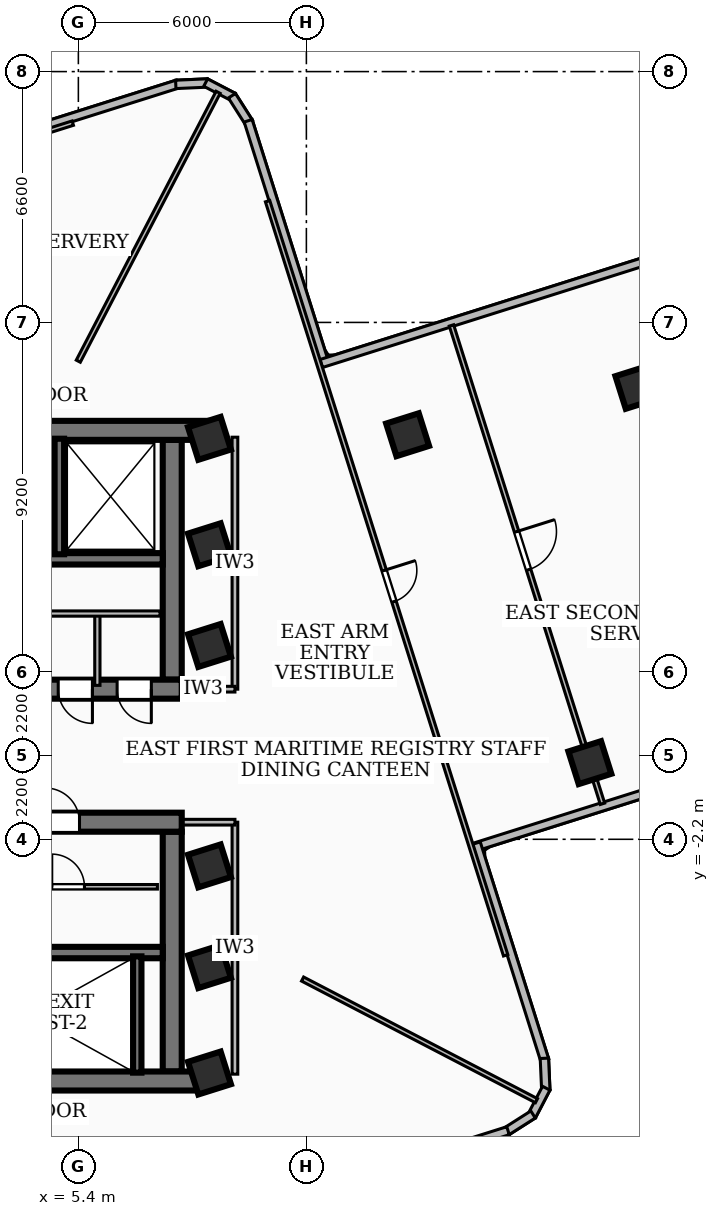
"""IFC4 building model, lengths in metres.
Left out: names, types, materials, properties, quantities, classifications, styles, units other than length and angle.
Written with IfcOpenShell. Run it as: python <this file> out.ifc"""

import sys

from ifc_helpers import new_model, si_unit, direction, frame, frame_2d, origin, origin_2d, place, context, subcontext, project, spatial, rectangle, extrude, element, fill, save


model = new_model("IFC4")
c1 = context("Model", 3, precision=1e-05, world=origin(), true_north=direction((0.0, 1.0)))
c2 = subcontext(c1, "Body", "Model", "MODEL_VIEW")
j1 = project(units=[si_unit("LENGTHUNIT", "METRE"), si_unit("PLANEANGLEUNIT", "RADIAN")], contexts=[c1])
p1 = place(None, origin())
s1 = spatial("IfcSite", under=j1, at=p1, CompositionType="ELEMENT")
p2 = place(p1, origin())
s2 = spatial("IfcBuilding", under=s1, at=p2, CompositionType="ELEMENT")
p3 = place(p2, frame((0.0, 0.0, 152.28)))
s3 = spatial("IfcBuildingStorey", under=s2, at=p3, CompositionType="ELEMENT", Elevation=152.28)
p4 = place(p3, frame((-8.78, 8.56, 0.0), z_axis=(0.0, 0.0, 1.0), x_axis=(1.0, 0.0, 0.0)))
e1 = element("IfcWall", 1, at=p4, inside=s3, PredefinedType="SHEAR", context=c2, shape_type="SweptSolid", body=[
    extrude(rectangle(XDim=17.56, YDim=0.5, at=frame_2d((8.78, 0.0))), origin(), (0.0, 0.0, 1.0), 3.34),
])
p5 = place(p3, frame((8.12, 1.75, 0.0), z_axis=(0.0, 0.0, 1.0), x_axis=(-1.0, 0.0, 0.0)))
e2 = element("IfcWall", 2, at=p5, inside=s3, PredefinedType="SHEAR", context=c2, shape_type="SweptSolid", body=[
    extrude(rectangle(XDim=16.24, YDim=0.5, at=frame_2d((8.12, 0.0))), origin(), (0.0, 0.0, 1.0), 3.34),
])
p6 = place(p5, frame((7.45, 0.0, 0.0)))
e3 = element("IfcOpeningElement", 3, at=p6, cuts=e2, PredefinedType="OPENING", context=c2, shape_type="SweptSolid", body=[
    extrude(rectangle(XDim=1.0, YDim=2.1, at=frame_2d((0.5, 1.05))), frame((0.0, 0.26, 0.0), z_axis=(0.0, -1.0, 0.0), x_axis=(1.0, 0.0, 0.0)), (0.0, 0.0, 1.0), 0.52),
])
p7 = place(p5, frame((3.85, 0.0, 0.0)))
e4 = element("IfcOpeningElement", 4, at=p7, cuts=e2, PredefinedType="OPENING", context=c2, shape_type="SweptSolid", body=[
    extrude(rectangle(XDim=0.9, YDim=2.06, at=frame_2d((0.45, 1.03))), frame((0.0, 0.26, 0.0), z_axis=(0.0, -1.0, 0.0), x_axis=(1.0, 0.0, 0.0)), (0.0, 0.0, 1.0), 0.52),
])
p8 = place(p5, frame((2.35, 0.0, 0.0)))
e5 = element("IfcOpeningElement", 5, at=p8, cuts=e2, PredefinedType="OPENING", context=c2, shape_type="SweptSolid", body=[
    extrude(rectangle(XDim=0.9, YDim=2.06, at=frame_2d((0.45, 1.03))), frame((0.0, 0.26, 0.0), z_axis=(0.0, -1.0, 0.0), x_axis=(1.0, 0.0, 0.0)), (0.0, 0.0, 1.0), 0.52),
])
p9 = place(p5, frame((0.8, 0.0, 0.0)))
e6 = element("IfcOpeningElement", 6, at=p9, cuts=e2, PredefinedType="OPENING", context=c2, shape_type="SweptSolid", body=[
    extrude(rectangle(XDim=0.9, YDim=2.06, at=frame_2d((0.45, 1.03))), frame((0.0, 0.26, 0.0), z_axis=(0.0, -1.0, 0.0), x_axis=(1.0, 0.0, 0.0)), (0.0, 0.0, 1.0), 0.52),
])
p10 = place(p3, frame((7.87, 8.31, 0.0), z_axis=(0.0, 0.0, 1.0), x_axis=(0.0, -1.0, 0.0)))
e7 = element("IfcWall", 7, at=p10, inside=s3, PredefinedType="SHEAR", context=c2, shape_type="SweptSolid", body=[
    extrude(rectangle(XDim=6.31, YDim=0.5, at=frame_2d((3.155, 0.0))), origin(), (0.0, 0.0, 1.0), 3.34),
])
p11 = place(p3, frame((7.62, 5.18, 0.0), z_axis=(0.0, 0.0, 1.0), x_axis=(-1.0, 0.0, 0.0)))
e8 = element("IfcWall", 8, at=p11, inside=s3, PredefinedType="SOLIDWALL", context=c2, shape_type="SweptSolid", body=[
    extrude(rectangle(XDim=15.24, YDim=0.3, at=frame_2d((7.62, 0.0))), origin(), (0.0, 0.0, 1.0), 3.34),
])
p12 = place(p11, frame((5.77, 0.0, 0.0)))
e9 = element("IfcOpeningElement", 9, at=p12, cuts=e8, PredefinedType="OPENING", context=c2, shape_type="SweptSolid", body=[
    extrude(rectangle(XDim=1.1, YDim=2.15, at=frame_2d((0.55, 1.075))), frame((0.0, 0.16, 0.0), z_axis=(0.0, -1.0, 0.0), x_axis=(1.0, 0.0, 0.0)), (0.0, 0.0, 1.0), 0.32),
])
p13 = place(p11, frame((2.97, 0.0, 0.0)))
e10 = element("IfcOpeningElement", 10, at=p13, cuts=e8, PredefinedType="OPENING", context=c2, shape_type="SweptSolid", body=[
    extrude(rectangle(XDim=1.1, YDim=2.15, at=frame_2d((0.55, 1.075))), frame((0.0, 0.16, 0.0), z_axis=(0.0, -1.0, 0.0), x_axis=(1.0, 0.0, 0.0)), (0.0, 0.0, 1.0), 0.32),
])
p14 = place(p11, frame((7.97, 0.0, 0.0)))
e11 = element("IfcOpeningElement", 11, at=p14, cuts=e8, PredefinedType="OPENING", context=c2, shape_type="SweptSolid", body=[
    extrude(rectangle(XDim=1.0, YDim=2.1, at=frame_2d((0.5, 1.05))), frame((0.0, 0.16, 0.0), z_axis=(0.0, -1.0, 0.0), x_axis=(1.0, 0.0, 0.0)), (0.0, 0.0, 1.0), 0.32),
])
p15 = place(p3, frame((8.78, -8.56, 0.0), z_axis=(0.0, 0.0, 1.0), x_axis=(-1.0, 0.0, 0.0)))
e12 = element("IfcWall", 12, at=p15, inside=s3, PredefinedType="SHEAR", context=c2, shape_type="SweptSolid", body=[
    extrude(rectangle(XDim=17.56, YDim=0.5, at=frame_2d((8.78, 0.0))), origin(), (0.0, 0.0, 1.0), 3.34),
])
p16 = place(p3, frame((-8.12, -1.75, 0.0), z_axis=(0.0, 0.0, 1.0), x_axis=(1.0, 0.0, 0.0)))
e13 = element("IfcWall", 13, at=p16, inside=s3, PredefinedType="SHEAR", context=c2, shape_type="SweptSolid", body=[
    extrude(rectangle(XDim=16.24, YDim=0.5, at=frame_2d((8.12, 0.0))), origin(), (0.0, 0.0, 1.0), 3.34),
])
p17 = place(p16, frame((7.45, 0.0, 0.0)))
e14 = element("IfcOpeningElement", 14, at=p17, cuts=e13, PredefinedType="OPENING", context=c2, shape_type="SweptSolid", body=[
    extrude(rectangle(XDim=1.0, YDim=2.1, at=frame_2d((0.5, 1.05))), frame((0.0, 0.26, 0.0), z_axis=(0.0, -1.0, 0.0), x_axis=(1.0, 0.0, 0.0)), (0.0, 0.0, 1.0), 0.52),
])
p18 = place(p16, frame((12.65, 0.0, 0.0)))
e15 = element("IfcOpeningElement", 15, at=p18, cuts=e13, PredefinedType="OPENING", context=c2, shape_type="SweptSolid", body=[
    extrude(rectangle(XDim=0.9, YDim=2.06, at=frame_2d((0.45, 1.03))), frame((0.0, 0.26, 0.0), z_axis=(0.0, -1.0, 0.0), x_axis=(1.0, 0.0, 0.0)), (0.0, 0.0, 1.0), 0.52),
])
p19 = place(p16, frame((0.565, 0.0, 0.0)))
e16 = element("IfcOpeningElement", 16, at=p19, cuts=e13, PredefinedType="OPENING", context=c2, shape_type="SweptSolid", body=[
    extrude(rectangle(XDim=1.05, YDim=2.15, at=frame_2d((0.525, 1.075))), frame((0.0, 0.26, 0.0), z_axis=(0.0, -1.0, 0.0), x_axis=(1.0, 0.0, 0.0)), (0.0, 0.0, 1.0), 0.52),
])
p20 = place(p16, frame((2.125, 0.0, 0.0)))
e17 = element("IfcOpeningElement", 17, at=p20, cuts=e13, PredefinedType="OPENING", context=c2, shape_type="SweptSolid", body=[
    extrude(rectangle(XDim=1.05, YDim=2.15, at=frame_2d((0.525, 1.075))), frame((0.0, 0.26, 0.0), z_axis=(0.0, -1.0, 0.0), x_axis=(1.0, 0.0, 0.0)), (0.0, 0.0, 1.0), 0.52),
])
p21 = place(p16, frame((3.685, 0.0, 0.0)))
e18 = element("IfcOpeningElement", 18, at=p21, cuts=e13, PredefinedType="OPENING", context=c2, shape_type="SweptSolid", body=[
    extrude(rectangle(XDim=1.05, YDim=2.15, at=frame_2d((0.525, 1.075))), frame((0.0, 0.26, 0.0), z_axis=(0.0, -1.0, 0.0), x_axis=(1.0, 0.0, 0.0)), (0.0, 0.0, 1.0), 0.52),
])
p22 = place(p3, frame((7.87, -2.0, 0.0), z_axis=(0.0, 0.0, 1.0), x_axis=(0.0, -1.0, 0.0)))
e19 = element("IfcWall", 19, at=p22, inside=s3, PredefinedType="SHEAR", context=c2, shape_type="SweptSolid", body=[
    extrude(rectangle(XDim=6.31, YDim=0.5, at=frame_2d((3.155, 0.0))), origin(), (0.0, 0.0, 1.0), 3.34),
])
p23 = place(p3, frame((-7.62, -5.18, 0.0), z_axis=(0.0, 0.0, 1.0), x_axis=(1.0, 0.0, 0.0)))
e20 = element("IfcWall", 20, at=p23, inside=s3, PredefinedType="SOLIDWALL", context=c2, shape_type="SweptSolid", body=[
    extrude(rectangle(XDim=15.24, YDim=0.3, at=frame_2d((7.62, 0.0))), origin(), (0.0, 0.0, 1.0), 3.34),
])
p24 = place(p23, frame((5.77, 0.0, 0.0)))
e21 = element("IfcOpeningElement", 21, at=p24, cuts=e20, PredefinedType="OPENING", context=c2, shape_type="SweptSolid", body=[
    extrude(rectangle(XDim=1.1, YDim=2.15, at=frame_2d((0.55, 1.075))), frame((0.0, 0.16, 0.0), z_axis=(0.0, -1.0, 0.0), x_axis=(1.0, 0.0, 0.0)), (0.0, 0.0, 1.0), 0.32),
])
p25 = place(p23, frame((7.97, 0.0, 0.0)))
e22 = element("IfcOpeningElement", 22, at=p25, cuts=e20, PredefinedType="OPENING", context=c2, shape_type="SweptSolid", body=[
    extrude(rectangle(XDim=1.0, YDim=2.1, at=frame_2d((0.5, 1.05))), frame((0.0, 0.16, 0.0), z_axis=(0.0, -1.0, 0.0), x_axis=(1.0, 0.0, 0.0)), (0.0, 0.0, 1.0), 0.32),
])
p26 = place(p3, frame((6.95, -8.34, 0.0), z_axis=(0.0, 0.0, 1.0), x_axis=(0.0, 1.0, 0.0)))
e23 = element("IfcWall", 23, at=p26, inside=s3, PredefinedType="SOLIDWALL", context=c2, shape_type="SweptSolid", body=[
    extrude(rectangle(XDim=3.06, YDim=0.22, at=frame_2d((1.53, 0.0))), origin(), (0.0, 0.0, 1.0), 3.34),
])
p27 = place(p3, frame((4.9, 5.3, 0.0), z_axis=(0.0, 0.0, 1.0), x_axis=(0.0, 1.0, 0.0)))
e24 = element("IfcWall", 24, at=p27, inside=s3, PredefinedType="SOLIDWALL", context=c2, shape_type="SweptSolid", body=[
    extrude(rectangle(XDim=3.04, YDim=0.25, at=frame_2d((1.52, 0.0))), origin(), (0.0, 0.0, 1.0), 3.34),
])
for number, where, z_axis, x_axis in (
    (25, (8.85, -5.55, 0.0), (0.0, 0.0, 1.0), (0.954, 0.301, 0.0)),
    (26, (8.85, -2.9, 0.0), (0.0, 0.0, 1.0), (0.954, 0.301, 0.0)),
    (27, (8.85, 2.9, 0.0), (0.0, 0.0, 1.0), (0.954, 0.301, 0.0)),
    (28, (8.85, 5.55, 0.0), (0.0, 0.0, 1.0), (0.954, 0.301, 0.0)),
    (29, (8.85, -8.35, 0.0), (0.0, 0.0, 1.0), (0.954, 0.301, 0.0)),
    (30, (8.85, 8.35, 0.0), (0.0, 0.0, 1.0), (0.954, 0.301, 0.0)),
    (31, (18.86, -0.183, 0.0), (0.0, 0.0, 1.0), (0.954, 0.301, 0.0)),
    (32, (14.064, 8.445, 0.0), (0.0, 0.0, 1.0), (0.954, 0.301, 0.0)),
    (33, (20.098, 9.692, 0.0), (0.0, 0.0, 1.0), (0.954, 0.301, 0.0)),
):
    element("IfcColumn", number, at=place(p3, frame(where, z_axis=z_axis, x_axis=x_axis)), inside=s3, PredefinedType="COLUMN", context=c2, shape_type="SweptSolid", body=[
        extrude(rectangle(XDim=0.9, YDim=0.9, at=origin_2d()), origin(), (0.0, 0.0, 1.0), 3.6),
    ])
p28 = place(p3, frame((2.301, 15.87, 0.0), z_axis=(0.0, 0.0, 1.0), x_axis=(0.953652264112, 0.300910882413, 0.0)))
e34 = element("IfcWall", 34, at=p28, inside=s3, PredefinedType="SOLIDWALL", context=c2, shape_type="SweptSolid", body=[
    extrude(rectangle(XDim=5.989, YDim=0.22, at=frame_2d((2.994, 0.0))), origin(), (0.0, 0.0, 1.0), 2.152),
])
p29 = place(p3, frame((7.963, 17.663, 0.0), z_axis=(0.0, 0.0, 1.0), x_axis=(0.99902501388, 0.044147725226, 0.0)))
e35 = element("IfcWall", 35, at=p29, inside=s3, PredefinedType="SOLIDWALL", context=c2, shape_type="SweptSolid", body=[
    extrude(rectangle(XDim=0.835, YDim=0.22, at=frame_2d((0.417, 0.0))), origin(), (0.0, 0.0, 1.0), 3.34),
])
p30 = place(p3, frame((8.75, 17.711, 0.0), z_axis=(0.0, 0.0, 1.0), x_axis=(0.886542320322, -0.462647505427, 0.0)))
e36 = element("IfcWall", 36, at=p30, inside=s3, PredefinedType="SOLIDWALL", context=c2, shape_type="SweptSolid", body=[
    extrude(rectangle(XDim=0.819, YDim=0.22, at=frame_2d((0.41, 0.0))), origin(), (0.0, 0.0, 1.0), 3.34),
])
p31 = place(p3, frame((9.441, 17.365, 0.0), z_axis=(0.0, 0.0, 1.0), x_axis=(0.536818702975, -0.84369762364, 0.0)))
e37 = element("IfcWall", 37, at=p31, inside=s3, PredefinedType="SOLIDWALL", context=c2, shape_type="SweptSolid", body=[
    extrude(rectangle(XDim=0.834, YDim=0.22, at=frame_2d((0.417, 0.0))), origin(), (0.0, 0.0, 1.0), 3.34),
])
p32 = place(p3, frame((9.868, 16.706, 0.0), z_axis=(0.0, 0.0, 1.0), x_axis=(0.300982683852, -0.953629605256, 0.0)))
e38 = element("IfcWall", 38, at=p32, inside=s3, PredefinedType="SOLIDWALL", context=c2, shape_type="SweptSolid", body=[
    extrude(rectangle(XDim=6.759, YDim=0.22, at=frame_2d((3.379, 0.0))), origin(), (0.0, 0.0, 1.0), 2.152),
])
p33 = place(p3, frame((11.792, 10.319, 0.0), z_axis=(0.0, 0.0, 1.0), x_axis=(0.953607060649, 0.301054104573, 0.0)))
e39 = element("IfcWall", 39, at=p33, inside=s3, PredefinedType="SOLIDWALL", context=c2, shape_type="SweptSolid", body=[
    extrude(rectangle(XDim=13.459, YDim=0.22, at=frame_2d((6.73, 0.0))), origin(), (0.0, 0.0, 1.0), 2.152),
])
p34 = place(p3, frame((28.646, 1.64, 0.0), z_axis=(0.0, 0.0, 1.0), x_axis=(-0.953626521982, -0.300992452685, 0.0)))
e40 = element("IfcWall", 40, at=p34, inside=s3, PredefinedType="SOLIDWALL", context=c2, shape_type="SweptSolid", body=[
    extrude(rectangle(XDim=13.458, YDim=0.22, at=frame_2d((6.729, 0.0))), origin(), (0.0, 0.0, 1.0), 3.34),
])
p35 = place(p34, frame((0.85, 0.0, 0.85)))
e41 = element("IfcOpeningElement", 41, at=p35, cuts=e40, PredefinedType="OPENING", context=c2, shape_type="SweptSolid", body=[
    extrude(rectangle(XDim=2.4, YDim=2.1, at=frame_2d((1.2, 1.05))), frame((0.0, 0.12, 0.0), z_axis=(0.0, -1.0, 0.0), x_axis=(1.0, 0.0, 0.0)), (0.0, 0.0, 1.0), 0.24),
])
p36 = place(p3, frame((15.87, -2.301, 0.0), z_axis=(0.0, 0.0, 1.0), x_axis=(0.300910882413, -0.953652264112, 0.0)))
e42 = element("IfcWall", 42, at=p36, inside=s3, PredefinedType="SOLIDWALL", context=c2, shape_type="SweptSolid", body=[
    extrude(rectangle(XDim=5.989, YDim=0.22, at=frame_2d((2.994, 0.0))), origin(), (0.0, 0.0, 1.0), 3.34),
])
p37 = place(p3, frame((17.663, -7.963, 0.0), z_axis=(0.0, 0.0, 1.0), x_axis=(0.044147725226, -0.99902501388, 0.0)))
e43 = element("IfcWall", 43, at=p37, inside=s3, PredefinedType="SOLIDWALL", context=c2, shape_type="SweptSolid", body=[
    extrude(rectangle(XDim=0.835, YDim=0.22, at=frame_2d((0.417, 0.0))), origin(), (0.0, 0.0, 1.0), 3.34),
])
p38 = place(p3, frame((17.711, -8.75, 0.0), z_axis=(0.0, 0.0, 1.0), x_axis=(-0.462647505427, -0.886542320322, 0.0)))
e44 = element("IfcWall", 44, at=p38, inside=s3, PredefinedType="SOLIDWALL", context=c2, shape_type="SweptSolid", body=[
    extrude(rectangle(XDim=0.819, YDim=0.22, at=frame_2d((0.41, 0.0))), origin(), (0.0, 0.0, 1.0), 3.34),
])
p39 = place(p3, frame((17.365, -9.441, 0.0), z_axis=(0.0, 0.0, 1.0), x_axis=(-0.84369762364, -0.536818702975, 0.0)))
e45 = element("IfcWall", 45, at=p39, inside=s3, PredefinedType="SOLIDWALL", context=c2, shape_type="SweptSolid", body=[
    extrude(rectangle(XDim=0.834, YDim=0.22, at=frame_2d((0.417, 0.0))), origin(), (0.0, 0.0, 1.0), 3.34),
])
p40 = place(p3, frame((16.706, -9.868, 0.0), z_axis=(0.0, 0.0, 1.0), x_axis=(-0.953629605256, -0.300982683852, 0.0)))
e46 = element("IfcWall", 46, at=p40, inside=s3, PredefinedType="SOLIDWALL", context=c2, shape_type="SweptSolid", body=[
    extrude(rectangle(XDim=6.759, YDim=0.22, at=frame_2d((3.379, 0.0))), origin(), (0.0, 0.0, 1.0), 3.34),
])
p41 = place(p3, frame((2.9, 3.74, 0.0), z_axis=(0.0, 0.0, 1.0), x_axis=(1.0, 0.0, 0.0)))
e47 = element("IfcWall", 47, at=p41, inside=s3, PredefinedType="PARTITIONING", context=c2, shape_type="SweptSolid", body=[
    extrude(rectangle(XDim=4.65, YDim=0.138, at=frame_2d((2.325, 0.0))), origin(), (0.0, 0.0, 1.0), 3.34),
])
p42 = place(p3, frame((2.8, -3.45, 0.0), z_axis=(0.0, 0.0, 1.0), x_axis=(1.0, 0.0, 0.0)))
e48 = element("IfcWall", 48, at=p42, inside=s3, PredefinedType="PARTITIONING", context=c2, shape_type="SweptSolid", body=[
    extrude(rectangle(XDim=4.68, YDim=0.12, at=frame_2d((2.34, 0.0))), origin(), (0.0, 0.0, 1.0), 3.34),
])
p43 = place(p42, frame((1.9, 0.0, 0.0)))
e49 = element("IfcOpeningElement", 49, at=p43, cuts=e48, PredefinedType="OPENING", context=c2, shape_type="SweptSolid", body=[
    extrude(rectangle(XDim=0.86, YDim=2.04, at=frame_2d((0.43, 1.02))), frame((0.0, 0.07, 0.0), z_axis=(0.0, -1.0, 0.0), x_axis=(1.0, 0.0, 0.0)), (0.0, 0.0, 1.0), 0.14),
])
p44 = place(p3, frame((5.9, 1.85, 0.0), z_axis=(0.0, 0.0, 1.0), x_axis=(0.0, 1.0, 0.0)))
e50 = element("IfcWall", 50, at=p44, inside=s3, PredefinedType="PARTITIONING", context=c2, shape_type="SweptSolid", body=[
    extrude(rectangle(XDim=1.89, YDim=0.138, at=frame_2d((0.945, 0.0))), origin(), (0.0, 0.0, 1.0), 2.57),
])
p45 = place(p3, frame((9.52, 1.75, 0.0), z_axis=(0.0, 0.0, 1.0), x_axis=(0.0, 1.0, 0.0)))
e51 = element("IfcWall", 51, at=p45, inside=s3, PredefinedType="PARTITIONING", context=c2, shape_type="SweptSolid", body=[
    extrude(rectangle(XDim=6.63, YDim=0.15, at=frame_2d((3.315, 0.0))), origin(), (0.0, 0.0, 1.0), 2.152),
])
p46 = place(p3, frame((7.85, 1.75, 0.0), z_axis=(0.0, 0.0, 1.0), x_axis=(1.0, 0.0, 0.0)))
e52 = element("IfcWall", 52, at=p46, inside=s3, PredefinedType="PARTITIONING", context=c2, shape_type="SweptSolid", body=[
    extrude(rectangle(XDim=1.67, YDim=0.15, at=frame_2d((0.835, 0.0))), origin(), (0.0, 0.0, 1.0), 2.57),
])
p47 = place(p3, frame((9.52, -8.38, 0.0), z_axis=(0.0, 0.0, 1.0), x_axis=(0.0, 1.0, 0.0)))
e53 = element("IfcWall", 53, at=p47, inside=s3, PredefinedType="PARTITIONING", context=c2, shape_type="SweptSolid", body=[
    extrude(rectangle(XDim=6.63, YDim=0.15, at=frame_2d((3.315, 0.0))), origin(), (0.0, 0.0, 1.0), 2.152),
])
p48 = place(p3, frame((7.85, -1.75, 0.0), z_axis=(0.0, 0.0, 1.0), x_axis=(1.0, 0.0, 0.0)))
e54 = element("IfcWall", 54, at=p48, inside=s3, PredefinedType="PARTITIONING", context=c2, shape_type="SweptSolid", body=[
    extrude(rectangle(XDim=1.67, YDim=0.15, at=frame_2d((0.835, 0.0))), origin(), (0.0, 0.0, 1.0), 2.57),
])
p49 = place(p3, frame((5.398, 10.38, 0.0), z_axis=(0.0, 0.0, 1.0), x_axis=(0.461434665806, 0.887174193263, 0.0)))
e55 = element("IfcWall", 55, at=p49, inside=s3, PredefinedType="PARTITIONING", context=c2, shape_type="SweptSolid", body=[
    extrude(rectangle(XDim=7.975, YDim=0.12, at=frame_2d((3.988, 0.0))), origin(), (0.0, 0.0, 1.0), 2.152),
])
p50 = place(p3, frame((11.3, -5.877, 0.0), z_axis=(0.0, 0.0, 1.0), x_axis=(0.887198362964, -0.461388193123, 0.0)))
e56 = element("IfcWall", 56, at=p50, inside=s3, PredefinedType="PARTITIONING", context=c2, shape_type="SweptSolid", body=[
    extrude(rectangle(XDim=6.938, YDim=0.12, at=frame_2d((3.469, 0.0))), origin(), (0.0, 0.0, 1.0), 3.34),
])
p51 = place(p3, frame((10.379, 14.591, 0.0), z_axis=(0.0, 0.0, 1.0), x_axis=(0.301070726534, -0.95360181293, 0.0)))
e57 = element("IfcWall", 57, at=p51, inside=s3, PredefinedType="PARTITIONING", context=c2, shape_type="SweptSolid", body=[
    extrude(rectangle(XDim=20.81, YDim=0.12, at=frame_2d((10.405, 0.0))), origin(), (0.0, 0.0, 1.0), 2.152),
])
p52 = place(p51, frame((10.189, 0.0, 0.0)))
e58 = element("IfcOpeningElement", 58, at=p52, cuts=e57, PredefinedType="OPENING", context=c2, shape_type="SweptSolid", body=[
    extrude(rectangle(XDim=0.86, YDim=2.0, at=frame_2d((0.43, 1.0))), frame((0.0, 0.07, 0.0), z_axis=(0.0, -1.0, 0.0), x_axis=(1.0, 0.0, 0.0)), (0.0, 0.0, 1.0), 0.14),
])
p53 = place(p3, frame((15.218, 11.321, 0.0), z_axis=(0.0, 0.0, 1.0), x_axis=(0.301061435932, -0.953604746105, 0.0)))
e59 = element("IfcWall", 59, at=p53, inside=s3, PredefinedType="PARTITIONING", context=c2, shape_type="SweptSolid", body=[
    extrude(rectangle(XDim=13.199, YDim=0.12, at=frame_2d((6.6, 0.0))), origin(), (0.0, 0.0, 1.0), 2.152),
])
p54 = place(p53, frame((5.69, 0.0, 0.0)))
e60 = element("IfcOpeningElement", 60, at=p54, cuts=e59, PredefinedType="OPENING", context=c2, shape_type="SweptSolid", body=[
    extrude(rectangle(XDim=1.05, YDim=2.08, at=frame_2d((0.525, 1.04))), frame((0.0, 0.07, 0.0), z_axis=(0.0, -1.0, 0.0), x_axis=(1.0, 0.0, 0.0)), (0.0, 0.0, 1.0), 0.14),
])
p55 = place(p3, frame((-14.591, 10.379, 0.0), z_axis=(0.0, 0.0, 1.0), x_axis=(0.95360181293, 0.301070726534, 0.0)))
e61 = element("IfcWall", 61, at=p55, inside=s3, PredefinedType="PARTITIONING", context=c2, shape_type="SweptSolid", body=[
    extrude(rectangle(XDim=20.81, YDim=0.12, at=frame_2d((10.405, 0.0))), origin(), (0.0, 0.0, 1.0), 2.152),
])
p56 = place(p55, frame((10.189, 0.0, 0.0)))
e62 = element("IfcOpeningElement", 62, at=p56, cuts=e61, PredefinedType="OPENING", context=c2, shape_type="SweptSolid", body=[
    extrude(rectangle(XDim=0.86, YDim=2.0, at=frame_2d((0.43, 1.0))), frame((0.0, 0.07, 0.0), z_axis=(0.0, -1.0, 0.0), x_axis=(1.0, 0.0, 0.0)), (0.0, 0.0, 1.0), 0.14),
])
p57 = place(p18, origin())
e63 = element("IfcDoor", 63, at=p57, inside=s3, OperationType="SINGLE_SWING_LEFT", PredefinedType="DOOR", context=c2, shape_type="SweptSolid", body=[
    extrude(rectangle(XDim=0.9, YDim=2.06, at=frame_2d((0.45, 1.03))), frame((0.0, 0.025, 0.0), z_axis=(0.0, -1.0, 0.0), x_axis=(1.0, 0.0, 0.0)), (0.0, 0.0, 1.0), 0.05),
])
fill(e15, e63)
p58 = place(p8, origin())
e64 = element("IfcDoor", 64, at=p58, inside=s3, OperationType="SINGLE_SWING_LEFT", PredefinedType="DOOR", context=c2, shape_type="SweptSolid", body=[
    extrude(rectangle(XDim=0.9, YDim=2.06, at=frame_2d((0.45, 1.03))), frame((0.0, 0.025, 0.0), z_axis=(0.0, -1.0, 0.0), x_axis=(1.0, 0.0, 0.0)), (0.0, 0.0, 1.0), 0.05),
])
fill(e5, e64)
p59 = place(p9, origin())
e65 = element("IfcDoor", 65, at=p59, inside=s3, OperationType="SINGLE_SWING_LEFT", PredefinedType="DOOR", context=c2, shape_type="SweptSolid", body=[
    extrude(rectangle(XDim=0.9, YDim=2.06, at=frame_2d((0.45, 1.03))), frame((0.0, 0.025, 0.0), z_axis=(0.0, -1.0, 0.0), x_axis=(1.0, 0.0, 0.0)), (0.0, 0.0, 1.0), 0.05),
])
fill(e6, e65)
p60 = place(p43, origin())
e66 = element("IfcDoor", 66, at=p60, inside=s3, OperationType="SINGLE_SWING_LEFT", PredefinedType="DOOR", context=c2, shape_type="SweptSolid", body=[
    extrude(rectangle(XDim=0.86, YDim=2.04, at=frame_2d((0.43, 1.02))), frame((0.0, 0.025, 0.0), z_axis=(0.0, -1.0, 0.0), x_axis=(1.0, 0.0, 0.0)), (0.0, 0.0, 1.0), 0.05),
])
fill(e49, e66)
p61 = place(p52, origin())
e67 = element("IfcDoor", 67, at=p61, inside=s3, OperationType="SINGLE_SWING_LEFT", PredefinedType="DOOR", context=c2, shape_type="SweptSolid", body=[
    extrude(rectangle(XDim=0.86, YDim=2.0, at=frame_2d((0.43, 1.0))), frame((0.0, 0.025, 0.0), z_axis=(0.0, -1.0, 0.0), x_axis=(1.0, 0.0, 0.0)), (0.0, 0.0, 1.0), 0.05),
])
fill(e58, e67)
p62 = place(p54, origin())
e68 = element("IfcDoor", 68, at=p62, inside=s3, OperationType="SINGLE_SWING_LEFT", PredefinedType="DOOR", context=c2, shape_type="SweptSolid", body=[
    extrude(rectangle(XDim=1.05, YDim=2.08, at=frame_2d((0.525, 1.04))), frame((0.0, 0.025, 0.0), z_axis=(0.0, -1.0, 0.0), x_axis=(1.0, 0.0, 0.0)), (0.0, 0.0, 1.0), 0.05),
])
fill(e60, e68)
save(model, sys.argv[1])
